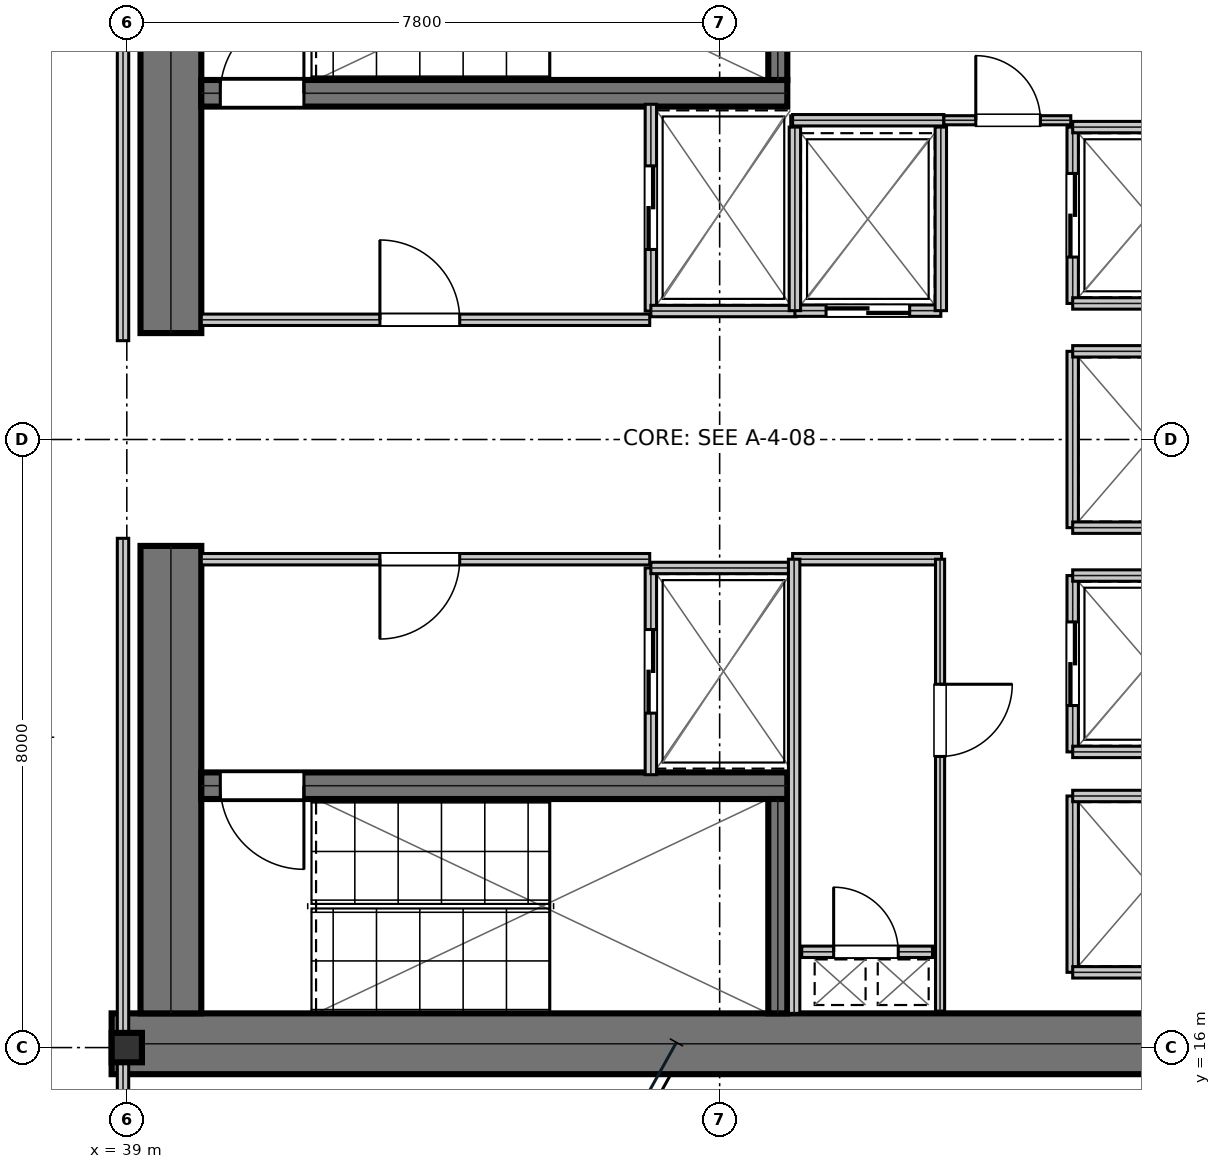
"""IFC4 building model, lengths in metres.
Left out: names, types, materials, properties, quantities, classifications, styles, units other than length and angle.
Written with IfcOpenShell. Run it as: python <this file> out.ifc"""

import sys

from ifc_helpers import new_model, si_unit, direction, frame, frame_2d, origin, origin_2d, place, context, subcontext, project, spatial, rectangle, i_section, extrude, element, fill, save


model = new_model("IFC4")
c1 = context("Model", 3, precision=1e-05, world=origin(), true_north=direction((0.0, 1.0)))
c2 = subcontext(c1, "Body", "Model", "MODEL_VIEW")
j1 = project(units=[si_unit("LENGTHUNIT", "METRE"), si_unit("PLANEANGLEUNIT", "RADIAN")], contexts=[c1])
p1 = place(None, origin())
s1 = spatial("IfcSite", under=j1, at=p1, CompositionType="ELEMENT")
p2 = place(p1, origin())
s2 = spatial("IfcBuilding", under=s1, at=p2, CompositionType="ELEMENT")
p3 = place(p2, frame((0.0, 0.0, 161.4)))
s3 = spatial("IfcBuildingStorey", under=s2, at=p3, CompositionType="ELEMENT", Elevation=161.4)
p4 = place(p3, frame((38.8, 16.05, 0.0), z_axis=(0.0, 0.0, 1.0), x_axis=(1.0, 0.0, 0.0)))
e1 = element("IfcWall", 1, at=p4, inside=s3, PredefinedType="SHEAR", context=c2, shape_type="SweptSolid", body=[
    extrude(rectangle(XDim=16.0, YDim=0.8, at=frame_2d((8.0, 0.0))), origin(), (0.0, 0.0, 1.0), 3.81),
])
for number, where, z_axis, x_axis in (
    (2, (39.58, 16.45, 0.0), (0.0, 0.0, 1.0), (0.0, 1.0, 0.0)),
    (3, (39.58, 25.4, 0.0), (0.0, 0.0, 1.0), (0.0, 1.0, 0.0)),
):
    element("IfcWall", number, at=place(p3, frame(where, z_axis=z_axis, x_axis=x_axis)), inside=s3, PredefinedType="SHEAR", context=c2, shape_type="SweptSolid", body=[
        extrude(rectangle(XDim=6.15, YDim=0.8, at=frame_2d((3.075, 0.0))), origin(), (0.0, 0.0, 1.0), 3.81),
    ])
p5 = place(p3, frame((39.98, 28.555, 0.0), z_axis=(0.0, 0.0, 1.0), x_axis=(1.0, 0.0, 0.0)))
e4 = element("IfcWall", 4, at=p5, inside=s3, PredefinedType="SHEAR", context=c2, shape_type="SweptSolid", body=[
    extrude(rectangle(XDim=7.71, YDim=0.35, at=frame_2d((3.855, 0.0))), origin(), (0.0, 0.0, 1.0), 3.81),
])
p6 = place(p5, frame((0.25, 0.0, 0.0)))
e5 = element("IfcOpeningElement", 5, at=p6, cuts=e4, PredefinedType="OPENING", context=c2, shape_type="SweptSolid", body=[
    extrude(rectangle(XDim=1.1, YDim=2.15, at=frame_2d((0.55, 1.075))), frame((0.0, 0.185, 0.0), z_axis=(0.0, -1.0, 0.0), x_axis=(1.0, 0.0, 0.0)), (0.0, 0.0, 1.0), 0.37),
])
p7 = place(p3, frame((39.98, 19.445, 0.0), z_axis=(0.0, 0.0, 1.0), x_axis=(1.0, 0.0, 0.0)))
e6 = element("IfcWall", 6, at=p7, inside=s3, PredefinedType="SHEAR", context=c2, shape_type="SweptSolid", body=[
    extrude(rectangle(XDim=7.71, YDim=0.35, at=frame_2d((3.855, 0.0))), origin(), (0.0, 0.0, 1.0), 3.81),
])
p8 = place(p7, frame((0.25, 0.0, 0.0)))
e7 = element("IfcOpeningElement", 7, at=p8, cuts=e6, PredefinedType="OPENING", context=c2, shape_type="SweptSolid", body=[
    extrude(rectangle(XDim=1.1, YDim=2.15, at=frame_2d((0.55, 1.075))), frame((0.0, 0.185, 0.0), z_axis=(0.0, -1.0, 0.0), x_axis=(1.0, 0.0, 0.0)), (0.0, 0.0, 1.0), 0.37),
])
for number, where, z_axis, x_axis in (
    (8, (47.565, 28.73, 0.0), (0.0, 0.0, 1.0), (0.0, 1.0, 0.0)),
    (9, (47.565, 16.45, 0.0), (0.0, 0.0, 1.0), (0.0, 1.0, 0.0)),
):
    element("IfcWall", number, at=place(p3, frame(where, z_axis=z_axis, x_axis=x_axis)), inside=s3, PredefinedType="SHEAR", context=c2, shape_type="SweptSolid", body=[
        extrude(rectangle(XDim=2.82, YDim=0.25, at=frame_2d((1.41, 0.0))), origin(), (0.0, 0.0, 1.0), 3.81),
    ])
p9 = place(p3, frame((39.0, 16.0, 0.0), z_axis=(0.0, 0.0, 1.0), x_axis=(1.0, 0.0, 0.0)))
e10 = element("IfcColumn", 10, at=p9, inside=s3, PredefinedType="COLUMN", context=c2, shape_type="SweptSolid", body=[
    extrude(i_section(OverallWidth=0.398, OverallDepth=0.387, WebThickness=0.021, FlangeThickness=0.033, at=origin_2d()), origin(), (0.0, 0.0, 1.0), 4.044),
])
p10 = place(p3, frame((39.98, 25.575, 0.0), z_axis=(0.0, 0.0, 1.0), x_axis=(1.0, 0.0, 0.0)))
e11 = element("IfcWall", 11, at=p10, inside=s3, PredefinedType="PARTITIONING", context=c2, shape_type="SweptSolid", body=[
    extrude(rectangle(XDim=5.9, YDim=0.15, at=frame_2d((2.95, 0.0))), origin(), (0.0, 0.0, 1.0), 3.81),
])
p11 = place(p10, frame((2.35, 0.0, 0.0)))
e12 = element("IfcOpeningElement", 12, at=p11, cuts=e11, PredefinedType="OPENING", context=c2, shape_type="SweptSolid", body=[
    extrude(rectangle(XDim=1.05, YDim=2.15, at=frame_2d((0.525, 1.075))), frame((0.0, 0.085, 0.0), z_axis=(0.0, -1.0, 0.0), x_axis=(1.0, 0.0, 0.0)), (0.0, 0.0, 1.0), 0.17),
])
p12 = place(p3, frame((39.98, 22.425, 0.0), z_axis=(0.0, 0.0, 1.0), x_axis=(1.0, 0.0, 0.0)))
e13 = element("IfcWall", 13, at=p12, inside=s3, PredefinedType="PARTITIONING", context=c2, shape_type="SweptSolid", body=[
    extrude(rectangle(XDim=5.9, YDim=0.15, at=frame_2d((2.95, 0.0))), origin(), (0.0, 0.0, 1.0), 3.81),
])
p13 = place(p12, frame((2.35, 0.0, 0.0)))
e14 = element("IfcOpeningElement", 14, at=p13, cuts=e13, PredefinedType="OPENING", context=c2, shape_type="SweptSolid", body=[
    extrude(rectangle(XDim=1.05, YDim=2.15, at=frame_2d((0.525, 1.075))), frame((0.0, 0.085, 0.0), z_axis=(0.0, -1.0, 0.0), x_axis=(1.0, 0.0, 0.0)), (0.0, 0.0, 1.0), 0.17),
])
p14 = place(p3, frame((45.895, 25.69, 0.0), z_axis=(0.0, 0.0, 1.0), x_axis=(0.0, 1.0, 0.0)))
e15 = element("IfcWall", 15, at=p14, inside=s3, PredefinedType="PARTITIONING", context=c2, shape_type="SweptSolid", body=[
    extrude(rectangle(XDim=2.72, YDim=0.15, at=frame_2d((1.36, 0.0))), origin(), (0.0, 0.0, 1.0), 3.81),
])
p15 = place(p14, frame((0.81, 0.0, 0.0)))
e16 = element("IfcOpeningElement", 16, at=p15, cuts=e15, PredefinedType="OPENING", context=c2, shape_type="SweptSolid", body=[
    extrude(rectangle(XDim=1.1, YDim=2.15, at=frame_2d((0.55, 1.075))), frame((0.0, 0.085, 0.0), z_axis=(0.0, -1.0, 0.0), x_axis=(1.0, 0.0, 0.0)), (0.0, 0.0, 1.0), 0.17),
])
p16 = place(p3, frame((45.895, 25.69, 0.0), z_axis=(0.0, 0.0, 1.0), x_axis=(1.0, 0.0, 0.0)))
e17 = element("IfcWall", 17, at=p16, inside=s3, PredefinedType="PARTITIONING", context=c2, shape_type="SweptSolid", body=[
    extrude(rectangle(XDim=1.915, YDim=0.15, at=frame_2d((0.958, 0.0))), origin(), (0.0, 0.0, 1.0), 3.81),
])
p17 = place(p3, frame((45.895, 19.59, 0.0), z_axis=(0.0, 0.0, 1.0), x_axis=(0.0, 1.0, 0.0)))
e18 = element("IfcWall", 18, at=p17, inside=s3, PredefinedType="PARTITIONING", context=c2, shape_type="SweptSolid", body=[
    extrude(rectangle(XDim=2.72, YDim=0.15, at=frame_2d((1.36, 0.0))), origin(), (0.0, 0.0, 1.0), 3.81),
])
p18 = place(p17, frame((0.81, 0.0, 0.0)))
e19 = element("IfcOpeningElement", 19, at=p18, cuts=e18, PredefinedType="OPENING", context=c2, shape_type="SweptSolid", body=[
    extrude(rectangle(XDim=1.1, YDim=2.15, at=frame_2d((0.55, 1.075))), frame((0.0, 0.085, 0.0), z_axis=(0.0, -1.0, 0.0), x_axis=(1.0, 0.0, 0.0)), (0.0, 0.0, 1.0), 0.17),
])
p19 = place(p3, frame((45.895, 22.31, 0.0), z_axis=(0.0, 0.0, 1.0), x_axis=(1.0, 0.0, 0.0)))
e20 = element("IfcWall", 20, at=p19, inside=s3, PredefinedType="PARTITIONING", context=c2, shape_type="SweptSolid", body=[
    extrude(rectangle(XDim=1.915, YDim=0.15, at=frame_2d((0.958, 0.0))), origin(), (0.0, 0.0, 1.0), 3.81),
])
p20 = place(p3, frame((47.79, 25.695, 0.0), z_axis=(0.0, 0.0, 1.0), x_axis=(1.0, 0.0, 0.0)))
e21 = element("IfcWall", 21, at=p20, inside=s3, PredefinedType="PARTITIONING", context=c2, shape_type="SweptSolid", body=[
    extrude(rectangle(XDim=1.92, YDim=0.15, at=frame_2d((0.96, 0.0))), origin(), (0.0, 0.0, 1.0), 3.81),
])
p21 = place(p20, frame((0.41, 0.0, 0.0)))
e22 = element("IfcOpeningElement", 22, at=p21, cuts=e21, PredefinedType="OPENING", context=c2, shape_type="SweptSolid", body=[
    extrude(rectangle(XDim=1.1, YDim=2.15, at=frame_2d((0.55, 1.075))), frame((0.0, 0.085, 0.0), z_axis=(0.0, -1.0, 0.0), x_axis=(1.0, 0.0, 0.0)), (0.0, 0.0, 1.0), 0.17),
])
for number, where, z_axis, x_axis in (
    (23, (47.79, 25.695, 0.0), (0.0, 0.0, 1.0), (0.0, 1.0, 0.0)),
    (24, (49.71, 25.695, 0.0), (0.0, 0.0, 1.0), (0.0, 1.0, 0.0)),
):
    element("IfcWall", number, at=place(p3, frame(where, z_axis=z_axis, x_axis=x_axis)), inside=s3, PredefinedType="PARTITIONING", context=c2, shape_type="SweptSolid", body=[
        extrude(rectangle(XDim=2.415, YDim=0.15, at=frame_2d((1.208, 0.0))), origin(), (0.0, 0.0, 1.0), 3.81),
    ])
p22 = place(p3, frame((51.445, 25.79, 0.0), z_axis=(0.0, 0.0, 1.0), x_axis=(0.0, 1.0, 0.0)))
e25 = element("IfcWall", 25, at=p22, inside=s3, PredefinedType="PARTITIONING", context=c2, shape_type="SweptSolid", body=[
    extrude(rectangle(XDim=2.32, YDim=0.15, at=frame_2d((1.16, 0.0))), origin(), (0.0, 0.0, 1.0), 3.81),
])
p23 = place(p22, frame((0.61, 0.0, 0.0)))
e26 = element("IfcOpeningElement", 26, at=p23, cuts=e25, PredefinedType="OPENING", context=c2, shape_type="SweptSolid", body=[
    extrude(rectangle(XDim=1.1, YDim=2.15, at=frame_2d((0.55, 1.075))), frame((0.0, 0.085, 0.0), z_axis=(0.0, -1.0, 0.0), x_axis=(1.0, 0.0, 0.0)), (0.0, 0.0, 1.0), 0.17),
])
for number, where, z_axis, x_axis in (
    (27, (51.445, 25.79, 0.0), (0.0, 0.0, 1.0), (1.0, 0.0, 0.0)),
    (28, (51.445, 28.11, 0.0), (0.0, 0.0, 1.0), (1.0, 0.0, 0.0)),
):
    element("IfcWall", number, at=place(p3, frame(where, z_axis=z_axis, x_axis=x_axis)), inside=s3, PredefinedType="PARTITIONING", context=c2, shape_type="SweptSolid", body=[
        extrude(rectangle(XDim=2.015, YDim=0.15, at=frame_2d((1.007, 0.0))), origin(), (0.0, 0.0, 1.0), 3.81),
    ])
p24 = place(p3, frame((51.445, 19.89, 0.0), z_axis=(0.0, 0.0, 1.0), x_axis=(0.0, 1.0, 0.0)))
e29 = element("IfcWall", 29, at=p24, inside=s3, PredefinedType="PARTITIONING", context=c2, shape_type="SweptSolid", body=[
    extrude(rectangle(XDim=2.32, YDim=0.15, at=frame_2d((1.16, 0.0))), origin(), (0.0, 0.0, 1.0), 3.81),
])
p25 = place(p24, frame((0.61, 0.0, 0.0)))
e30 = element("IfcOpeningElement", 30, at=p25, cuts=e29, PredefinedType="OPENING", context=c2, shape_type="SweptSolid", body=[
    extrude(rectangle(XDim=1.1, YDim=2.15, at=frame_2d((0.55, 1.075))), frame((0.0, 0.085, 0.0), z_axis=(0.0, -1.0, 0.0), x_axis=(1.0, 0.0, 0.0)), (0.0, 0.0, 1.0), 0.17),
])
for number, where, z_axis, x_axis in (
    (31, (51.445, 19.89, 0.0), (0.0, 0.0, 1.0), (1.0, 0.0, 0.0)),
    (32, (51.445, 22.21, 0.0), (0.0, 0.0, 1.0), (1.0, 0.0, 0.0)),
):
    element("IfcWall", number, at=place(p3, frame(where, z_axis=z_axis, x_axis=x_axis)), inside=s3, PredefinedType="PARTITIONING", context=c2, shape_type="SweptSolid", body=[
        extrude(rectangle(XDim=2.015, YDim=0.15, at=frame_2d((1.007, 0.0))), origin(), (0.0, 0.0, 1.0), 3.81),
    ])
p26 = place(p3, frame((51.445, 22.84, 0.0), z_axis=(0.0, 0.0, 1.0), x_axis=(0.0, 1.0, 0.0)))
e33 = element("IfcWall", 33, at=p26, inside=s3, PredefinedType="PARTITIONING", context=c2, shape_type="SweptSolid", body=[
    extrude(rectangle(XDim=2.32, YDim=0.15, at=frame_2d((1.16, 0.0))), origin(), (0.0, 0.0, 1.0), 3.81),
])
for number, where, z_axis, x_axis in (
    (34, (51.445, 22.84, 0.0), (0.0, 0.0, 1.0), (1.0, 0.0, 0.0)),
    (35, (51.445, 25.16, 0.0), (0.0, 0.0, 1.0), (1.0, 0.0, 0.0)),
):
    element("IfcWall", number, at=place(p3, frame(where, z_axis=z_axis, x_axis=x_axis)), inside=s3, PredefinedType="PARTITIONING", context=c2, shape_type="SweptSolid", body=[
        extrude(rectangle(XDim=2.015, YDim=0.15, at=frame_2d((1.007, 0.0))), origin(), (0.0, 0.0, 1.0), 3.81),
    ])
p27 = place(p3, frame((51.445, 16.99, 0.0), z_axis=(0.0, 0.0, 1.0), x_axis=(0.0, 1.0, 0.0)))
e36 = element("IfcWall", 36, at=p27, inside=s3, PredefinedType="PARTITIONING", context=c2, shape_type="SweptSolid", body=[
    extrude(rectangle(XDim=2.32, YDim=0.15, at=frame_2d((1.16, 0.0))), origin(), (0.0, 0.0, 1.0), 3.81),
])
for number, where, z_axis, x_axis in (
    (37, (51.445, 16.99, 0.0), (0.0, 0.0, 1.0), (1.0, 0.0, 0.0)),
    (38, (51.445, 19.31, 0.0), (0.0, 0.0, 1.0), (1.0, 0.0, 0.0)),
):
    element("IfcWall", number, at=place(p3, frame(where, z_axis=z_axis, x_axis=x_axis)), inside=s3, PredefinedType="PARTITIONING", context=c2, shape_type="SweptSolid", body=[
        extrude(rectangle(XDim=2.015, YDim=0.15, at=frame_2d((1.007, 0.0))), origin(), (0.0, 0.0, 1.0), 3.81),
    ])
p28 = place(p3, frame((47.88, 17.26, 0.0), z_axis=(0.0, 0.0, 1.0), x_axis=(1.0, 0.0, 0.0)))
e39 = element("IfcWall", 39, at=p28, inside=s3, PredefinedType="PARTITIONING", context=c2, shape_type="SweptSolid", body=[
    extrude(rectangle(XDim=1.72, YDim=0.15, at=frame_2d((0.86, 0.0))), origin(), (0.0, 0.0, 1.0), 3.81),
])
p29 = place(p28, frame((0.42, 0.0, 0.0)))
e40 = element("IfcOpeningElement", 40, at=p29, cuts=e39, PredefinedType="OPENING", context=c2, shape_type="SweptSolid", body=[
    extrude(rectangle(XDim=0.85, YDim=2.15, at=frame_2d((0.425, 1.075))), frame((0.0, 0.085, 0.0), z_axis=(0.0, -1.0, 0.0), x_axis=(1.0, 0.0, 0.0)), (0.0, 0.0, 1.0), 0.17),
])
p30 = place(p3, frame((47.76, 22.425, 0.0), z_axis=(0.0, 0.0, 1.0), x_axis=(1.0, 0.0, 0.0)))
e41 = element("IfcWall", 41, at=p30, inside=s3, PredefinedType="PARTITIONING", context=c2, shape_type="SweptSolid", body=[
    extrude(rectangle(XDim=1.96, YDim=0.15, at=frame_2d((0.98, 0.0))), origin(), (0.0, 0.0, 1.0), 3.81),
])
p31 = place(p3, frame((47.78, 16.45, 0.0), z_axis=(0.0, 0.0, 1.0), x_axis=(0.0, 1.0, 0.0)))
e42 = element("IfcWall", 42, at=p31, inside=s3, PredefinedType="PARTITIONING", context=c2, shape_type="SweptSolid", body=[
    extrude(rectangle(XDim=5.975, YDim=0.15, at=frame_2d((2.988, 0.0))), origin(), (0.0, 0.0, 1.0), 3.81),
])
p32 = place(p3, frame((49.7, 16.48, 0.0), z_axis=(0.0, 0.0, 1.0), x_axis=(0.0, 1.0, 0.0)))
e43 = element("IfcWall", 43, at=p32, inside=s3, PredefinedType="PARTITIONING", context=c2, shape_type="SweptSolid", body=[
    extrude(rectangle(XDim=5.945, YDim=0.12, at=frame_2d((2.973, 0.0))), origin(), (0.0, 0.0, 1.0), 3.81),
])
p33 = place(p32, frame((3.35, 0.0, 0.0)))
e44 = element("IfcOpeningElement", 44, at=p33, cuts=e43, PredefinedType="OPENING", context=c2, shape_type="SweptSolid", body=[
    extrude(rectangle(XDim=0.95, YDim=2.15, at=frame_2d((0.475, 1.075))), frame((0.0, 0.07, 0.0), z_axis=(0.0, -1.0, 0.0), x_axis=(1.0, 0.0, 0.0)), (0.0, 0.0, 1.0), 0.14),
])
p34 = place(p3, frame((47.76, 28.2, 0.0), z_axis=(0.0, 0.0, 1.0), x_axis=(1.0, 0.0, 0.0)))
e45 = element("IfcWall", 45, at=p34, inside=s3, PredefinedType="PARTITIONING", context=c2, shape_type="SweptSolid", body=[
    extrude(rectangle(XDim=1.99, YDim=0.15, at=frame_2d((0.995, 0.0))), origin(), (0.0, 0.0, 1.0), 3.81),
])
p35 = place(p3, frame((49.75, 28.2, 0.0), z_axis=(0.0, 0.0, 1.0), x_axis=(1.0, 0.0, 0.0)))
e46 = element("IfcWall", 46, at=p35, inside=s3, PredefinedType="PARTITIONING", context=c2, shape_type="SweptSolid", body=[
    extrude(rectangle(XDim=1.67, YDim=0.12, at=frame_2d((0.835, 0.0))), origin(), (0.0, 0.0, 1.0), 3.81),
])
p36 = place(p35, frame((0.42, 0.0, 0.0)))
e47 = element("IfcOpeningElement", 47, at=p36, cuts=e46, PredefinedType="OPENING", context=c2, shape_type="SweptSolid", body=[
    extrude(rectangle(XDim=0.85, YDim=2.15, at=frame_2d((0.425, 1.075))), frame((0.0, 0.07, 0.0), z_axis=(0.0, -1.0, 0.0), x_axis=(1.0, 0.0, 0.0)), (0.0, 0.0, 1.0), 0.14),
])
p37 = place(p3, frame((38.95, 14.5, 0.0), z_axis=(0.0, 0.0, 1.0), x_axis=(0.0, 1.0, 0.0)))
e48 = element("IfcWall", 48, at=p37, inside=s3, PredefinedType="PARTITIONING", context=c2, shape_type="SweptSolid", body=[
    extrude(rectangle(XDim=8.2, YDim=0.15, at=frame_2d((4.1, 0.0))), origin(), (0.0, 0.0, 1.0), 3.19),
])
p38 = place(p3, frame((38.95, 25.3, 0.0), z_axis=(0.0, 0.0, 1.0), x_axis=(0.0, 1.0, 0.0)))
e49 = element("IfcWall", 49, at=p38, inside=s3, PredefinedType="PARTITIONING", context=c2, shape_type="SweptSolid", body=[
    extrude(rectangle(XDim=6.466, YDim=0.15, at=frame_2d((3.233, 0.0))), origin(), (0.0, 0.0, 1.0), 3.443),
])
p39 = place(p11, origin())
e50 = element("IfcDoor", 50, at=p39, inside=s3, OperationType="SINGLE_SWING_LEFT", PredefinedType="DOOR", context=c2, shape_type="SweptSolid", body=[
    extrude(rectangle(XDim=1.05, YDim=2.15, at=frame_2d((0.525, 1.075))), frame((0.0, 0.025, 0.0), z_axis=(0.0, -1.0, 0.0), x_axis=(1.0, 0.0, 0.0)), (0.0, 0.0, 1.0), 0.05),
])
fill(e12, e50)
p40 = place(p13, frame((1.05, 0.0, 0.0), z_axis=(0.0, 0.0, 1.0), x_axis=(-1.0, 0.0, 0.0)))
e51 = element("IfcDoor", 51, at=p40, inside=s3, OperationType="SINGLE_SWING_RIGHT", PredefinedType="DOOR", context=c2, shape_type="SweptSolid", body=[
    extrude(rectangle(XDim=1.05, YDim=2.15, at=frame_2d((0.525, 1.075))), frame((0.0, 0.025, 0.0), z_axis=(0.0, -1.0, 0.0), x_axis=(1.0, 0.0, 0.0)), (0.0, 0.0, 1.0), 0.05),
])
fill(e14, e51)
p41 = place(p15, frame((1.1, 0.0, 0.0), z_axis=(0.0, 0.0, 1.0), x_axis=(-1.0, 0.0, 0.0)))
e52 = element("IfcDoor", 52, at=p41, inside=s3, OperationType="DOUBLE_DOOR_SLIDING", PredefinedType="DOOR", context=c2, shape_type="SweptSolid", body=[
    extrude(rectangle(XDim=1.1, YDim=2.15, at=frame_2d((0.55, 1.075))), frame((0.0, 0.025, 0.0), z_axis=(0.0, -1.0, 0.0), x_axis=(1.0, 0.0, 0.0)), (0.0, 0.0, 1.0), 0.05),
])
fill(e16, e52)
p42 = place(p18, frame((1.1, 0.0, 0.0), z_axis=(0.0, 0.0, 1.0), x_axis=(-1.0, 0.0, 0.0)))
e53 = element("IfcDoor", 53, at=p42, inside=s3, OperationType="DOUBLE_DOOR_SLIDING", PredefinedType="DOOR", context=c2, shape_type="SweptSolid", body=[
    extrude(rectangle(XDim=1.1, YDim=2.15, at=frame_2d((0.55, 1.075))), frame((0.0, 0.025, 0.0), z_axis=(0.0, -1.0, 0.0), x_axis=(1.0, 0.0, 0.0)), (0.0, 0.0, 1.0), 0.05),
])
fill(e19, e53)
p43 = place(p21, frame((1.1, 0.0, 0.0), z_axis=(0.0, 0.0, 1.0), x_axis=(-1.0, 0.0, 0.0)))
e54 = element("IfcDoor", 54, at=p43, inside=s3, OperationType="DOUBLE_DOOR_SLIDING", PredefinedType="DOOR", context=c2, shape_type="SweptSolid", body=[
    extrude(rectangle(XDim=1.1, YDim=2.15, at=frame_2d((0.55, 1.075))), frame((0.0, 0.025, 0.0), z_axis=(0.0, -1.0, 0.0), x_axis=(1.0, 0.0, 0.0)), (0.0, 0.0, 1.0), 0.05),
])
fill(e22, e54)
p44 = place(p23, frame((1.1, 0.0, 0.0), z_axis=(0.0, 0.0, 1.0), x_axis=(-1.0, 0.0, 0.0)))
e55 = element("IfcDoor", 55, at=p44, inside=s3, OperationType="DOUBLE_DOOR_SLIDING", PredefinedType="DOOR", context=c2, shape_type="SweptSolid", body=[
    extrude(rectangle(XDim=1.1, YDim=2.15, at=frame_2d((0.55, 1.075))), frame((0.0, 0.025, 0.0), z_axis=(0.0, -1.0, 0.0), x_axis=(1.0, 0.0, 0.0)), (0.0, 0.0, 1.0), 0.05),
])
fill(e26, e55)
p45 = place(p25, frame((1.1, 0.0, 0.0), z_axis=(0.0, 0.0, 1.0), x_axis=(-1.0, 0.0, 0.0)))
e56 = element("IfcDoor", 56, at=p45, inside=s3, OperationType="DOUBLE_DOOR_SLIDING", PredefinedType="DOOR", context=c2, shape_type="SweptSolid", body=[
    extrude(rectangle(XDim=1.1, YDim=2.15, at=frame_2d((0.55, 1.075))), frame((0.0, 0.025, 0.0), z_axis=(0.0, -1.0, 0.0), x_axis=(1.0, 0.0, 0.0)), (0.0, 0.0, 1.0), 0.05),
])
fill(e30, e56)
p46 = place(p29, origin())
e57 = element("IfcDoor", 57, at=p46, inside=s3, OperationType="SINGLE_SWING_LEFT", PredefinedType="TRAPDOOR", context=c2, shape_type="SweptSolid", body=[
    extrude(rectangle(XDim=0.85, YDim=2.15, at=frame_2d((0.425, 1.075))), frame((0.0, 0.025, 0.0), z_axis=(0.0, -1.0, 0.0), x_axis=(1.0, 0.0, 0.0)), (0.0, 0.0, 1.0), 0.05),
])
fill(e40, e57)
p47 = place(p33, frame((0.95, 0.0, 0.0), z_axis=(0.0, 0.0, 1.0), x_axis=(-1.0, 0.0, 0.0)))
e58 = element("IfcDoor", 58, at=p47, inside=s3, OperationType="SINGLE_SWING_LEFT", PredefinedType="DOOR", context=c2, shape_type="SweptSolid", body=[
    extrude(rectangle(XDim=0.95, YDim=2.15, at=frame_2d((0.475, 1.075))), frame((0.0, 0.025, 0.0), z_axis=(0.0, -1.0, 0.0), x_axis=(1.0, 0.0, 0.0)), (0.0, 0.0, 1.0), 0.05),
])
fill(e44, e58)
p48 = place(p36, origin())
e59 = element("IfcDoor", 59, at=p48, inside=s3, OperationType="SINGLE_SWING_LEFT", PredefinedType="DOOR", context=c2, shape_type="SweptSolid", body=[
    extrude(rectangle(XDim=0.85, YDim=2.15, at=frame_2d((0.425, 1.075))), frame((0.0, 0.025, 0.0), z_axis=(0.0, -1.0, 0.0), x_axis=(1.0, 0.0, 0.0)), (0.0, 0.0, 1.0), 0.05),
])
fill(e47, e59)
p49 = place(p6, origin())
e60 = element("IfcDoor", 60, at=p49, inside=s3, OperationType="SINGLE_SWING_RIGHT", PredefinedType="DOOR", context=c2, shape_type="SweptSolid", body=[
    extrude(rectangle(XDim=1.1, YDim=2.15, at=frame_2d((0.55, 1.075))), frame((0.0, 0.025, 0.0), z_axis=(0.0, -1.0, 0.0), x_axis=(1.0, 0.0, 0.0)), (0.0, 0.0, 1.0), 0.05),
])
fill(e5, e60)
p50 = place(p8, frame((1.1, 0.0, 0.0), z_axis=(0.0, 0.0, 1.0), x_axis=(-1.0, 0.0, 0.0)))
e61 = element("IfcDoor", 61, at=p50, inside=s3, OperationType="SINGLE_SWING_LEFT", PredefinedType="DOOR", context=c2, shape_type="SweptSolid", body=[
    extrude(rectangle(XDim=1.1, YDim=2.15, at=frame_2d((0.55, 1.075))), frame((0.0, 0.025, 0.0), z_axis=(0.0, -1.0, 0.0), x_axis=(1.0, 0.0, 0.0)), (0.0, 0.0, 1.0), 0.05),
])
fill(e7, e61)
save(model, sys.argv[1])
